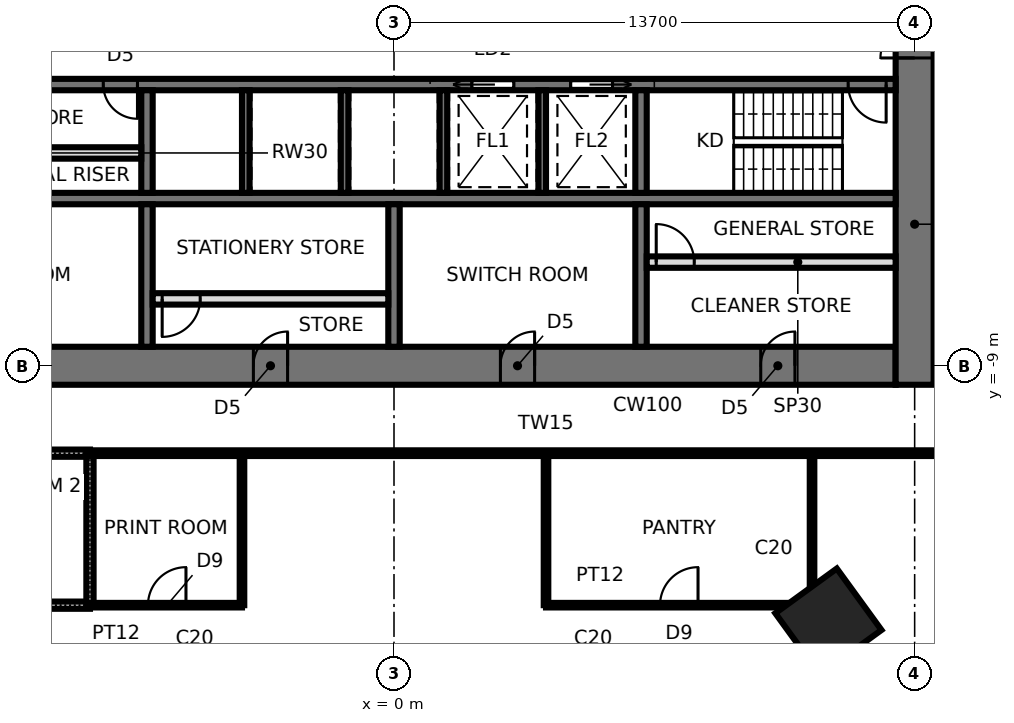
"""IFC4 building model, lengths in metres.
Left out: names, types, materials, properties, quantities, classifications, styles, units other than length and angle.
Written with IfcOpenShell. Run it as: python <this file> out.ifc"""

import sys

from ifc_helpers import new_model, si_unit, direction, frame, frame_2d, origin, origin_2d, place, context, subcontext, project, spatial, rectangle, extrude, element, fill, save


model = new_model("IFC4")
c1 = context("Model", 3, precision=1e-05, world=origin(), true_north=direction((0.0, 1.0)))
c2 = subcontext(c1, "Body", "Model", "MODEL_VIEW")
j1 = project(units=[si_unit("LENGTHUNIT", "METRE"), si_unit("PLANEANGLEUNIT", "RADIAN")], contexts=[c1])
p1 = place(None, origin())
s1 = spatial("IfcSite", under=j1, at=p1, CompositionType="ELEMENT")
p2 = place(p1, origin())
s2 = spatial("IfcBuilding", under=s1, at=p2, CompositionType="ELEMENT")
p3 = place(p2, frame((0.0, 0.0, 32.2)))
s3 = spatial("IfcBuildingStorey", under=s2, at=p3, CompositionType="ELEMENT", Elevation=32.2)
p4 = place(p3, frame((11.43, -15.733, 0.0), z_axis=(0.0, 0.0, 1.0), x_axis=(0.587785252292, -0.809016994375, 0.0)))
e1 = element("IfcColumn", 1, at=p4, inside=s3, PredefinedType="COLUMN", context=c2, shape_type="SweptSolid", body=[
    extrude(rectangle(XDim=2.0, YDim=2.0, at=origin_2d()), origin(), (0.0, 0.0, 1.0), 4.2),
])
p5 = place(p3, frame((-13.2, -9.0, 0.0), z_axis=(0.0, 0.0, 1.0), x_axis=(1.0, 0.0, 0.0)))
e2 = element("IfcWall", 2, at=p5, inside=s3, PredefinedType="SHEAR", context=c2, shape_type="SweptSolid", body=[
    extrude(rectangle(XDim=26.4, YDim=1.0, at=frame_2d((13.2, 0.0))), origin(), (0.0, 0.0, 1.0), 4.2),
])
p6 = place(p5, frame((2.65, 0.0, 0.0)))
e3 = element("IfcOpeningElement", 3, at=p6, cuts=e2, PredefinedType="OPENING", context=c2, shape_type="SweptSolid", body=[
    extrude(rectangle(XDim=0.9, YDim=2.1, at=frame_2d((0.45, 1.05))), frame((0.0, 0.51, 0.0), z_axis=(0.0, -1.0, 0.0), x_axis=(1.0, 0.0, 0.0)), (0.0, 0.0, 1.0), 1.02),
])
p7 = place(p5, frame((9.5, 0.0, 0.0)))
e4 = element("IfcOpeningElement", 4, at=p7, cuts=e2, PredefinedType="OPENING", context=c2, shape_type="SweptSolid", body=[
    extrude(rectangle(XDim=0.9, YDim=2.1, at=frame_2d((0.45, 1.05))), frame((0.0, 0.51, 0.0), z_axis=(0.0, -1.0, 0.0), x_axis=(1.0, 0.0, 0.0)), (0.0, 0.0, 1.0), 1.02),
])
p8 = place(p5, frame((16.0, 0.0, 0.0)))
e5 = element("IfcOpeningElement", 5, at=p8, cuts=e2, PredefinedType="OPENING", context=c2, shape_type="SweptSolid", body=[
    extrude(rectangle(XDim=0.9, YDim=2.1, at=frame_2d((0.45, 1.05))), frame((0.0, 0.51, 0.0), z_axis=(0.0, -1.0, 0.0), x_axis=(1.0, 0.0, 0.0)), (0.0, 0.0, 1.0), 1.02),
])
p9 = place(p5, frame((22.85, 0.0, 0.0)))
e6 = element("IfcOpeningElement", 6, at=p9, cuts=e2, PredefinedType="OPENING", context=c2, shape_type="SweptSolid", body=[
    extrude(rectangle(XDim=0.9, YDim=2.1, at=frame_2d((0.45, 1.05))), frame((0.0, 0.51, 0.0), z_axis=(0.0, -1.0, 0.0), x_axis=(1.0, 0.0, 0.0)), (0.0, 0.0, 1.0), 1.02),
])
p10 = place(p3, frame((13.7, -9.5, 0.0), z_axis=(0.0, 0.0, 1.0), x_axis=(0.0, 1.0, 0.0)))
e7 = element("IfcWall", 7, at=p10, inside=s3, PredefinedType="SHEAR", context=c2, shape_type="SweptSolid", body=[
    extrude(rectangle(XDim=19.0, YDim=1.0, at=frame_2d((9.5, 0.0))), origin(), (0.0, 0.0, 1.0), 4.2),
])
p11 = place(p10, frame((8.6, 0.0, 0.0)))
e8 = element("IfcOpeningElement", 8, at=p11, cuts=e7, PredefinedType="OPENING", context=c2, shape_type="SweptSolid", body=[
    extrude(rectangle(XDim=1.8, YDim=2.4, at=frame_2d((0.9, 1.2))), frame((0.0, 0.51, 0.0), z_axis=(0.0, -1.0, 0.0), x_axis=(1.0, 0.0, 0.0)), (0.0, 0.0, 1.0), 1.02),
])
p12 = place(p3, frame((-13.2, -1.6, 0.0), z_axis=(0.0, 0.0, 1.0), x_axis=(1.0, 0.0, 0.0)))
e9 = element("IfcWall", 9, at=p12, inside=s3, PredefinedType="SHEAR", context=c2, shape_type="SweptSolid", body=[
    extrude(rectangle(XDim=26.4, YDim=0.3, at=frame_2d((13.2, 0.0))), origin(), (0.0, 0.0, 1.0), 4.2),
])
p13 = place(p12, frame((25.15, 0.0, 0.0)))
e10 = element("IfcOpeningElement", 10, at=p13, cuts=e9, PredefinedType="OPENING", context=c2, shape_type="SweptSolid", body=[
    extrude(rectangle(XDim=1.0, YDim=2.1, at=frame_2d((0.5, 1.05))), frame((0.0, 0.16, 0.0), z_axis=(0.0, -1.0, 0.0), x_axis=(1.0, 0.0, 0.0)), (0.0, 0.0, 1.0), 0.32),
])
p14 = place(p12, frame((15.25, 0.0, 0.0)))
e11 = element("IfcOpeningElement", 11, at=p14, cuts=e9, PredefinedType="OPENING", context=c2, shape_type="SweptSolid", body=[
    extrude(rectangle(XDim=1.1, YDim=2.3, at=frame_2d((0.55, 1.15))), frame((0.0, 0.16, 0.0), z_axis=(0.0, -1.0, 0.0), x_axis=(1.0, 0.0, 0.0)), (0.0, 0.0, 1.0), 0.32),
])
p15 = place(p12, frame((17.85, 0.0, 0.0)))
e12 = element("IfcOpeningElement", 12, at=p15, cuts=e9, PredefinedType="OPENING", context=c2, shape_type="SweptSolid", body=[
    extrude(rectangle(XDim=1.1, YDim=2.3, at=frame_2d((0.55, 1.15))), frame((0.0, 0.16, 0.0), z_axis=(0.0, -1.0, 0.0), x_axis=(1.0, 0.0, 0.0)), (0.0, 0.0, 1.0), 0.32),
])
p16 = place(p12, frame((5.55, 0.0, 0.0)))
e13 = element("IfcOpeningElement", 13, at=p16, cuts=e9, PredefinedType="OPENING", context=c2, shape_type="SweptSolid", body=[
    extrude(rectangle(XDim=0.9, YDim=2.1, at=frame_2d((0.45, 1.05))), frame((0.0, 0.16, 0.0), z_axis=(0.0, -1.0, 0.0), x_axis=(1.0, 0.0, 0.0)), (0.0, 0.0, 1.0), 0.32),
])
p17 = place(p3, frame((-13.2, -4.6, 0.0), z_axis=(0.0, 0.0, 1.0), x_axis=(1.0, 0.0, 0.0)))
e14 = element("IfcWall", 14, at=p17, inside=s3, PredefinedType="SHEAR", context=c2, shape_type="SweptSolid", body=[
    extrude(rectangle(XDim=26.4, YDim=0.3, at=frame_2d((13.2, 0.0))), origin(), (0.0, 0.0, 1.0), 4.2),
])
p18 = place(p3, frame((-6.5, -1.75, 0.0), z_axis=(0.0, 0.0, 1.0), x_axis=(0.0, -1.0, 0.0)))
e15 = element("IfcWall", 15, at=p18, inside=s3, PredefinedType="SHEAR", context=c2, shape_type="SweptSolid", body=[
    extrude(rectangle(XDim=2.7, YDim=0.3, at=frame_2d((1.35, 0.0))), origin(), (0.0, 0.0, 1.0), 4.2),
])
p19 = place(p3, frame((-6.5, -4.75, 0.0), z_axis=(0.0, 0.0, 1.0), x_axis=(0.0, -1.0, 0.0)))
e16 = element("IfcWall", 16, at=p19, inside=s3, PredefinedType="SHEAR", context=c2, shape_type="SweptSolid", body=[
    extrude(rectangle(XDim=3.75, YDim=0.3, at=frame_2d((1.875, 0.0))), origin(), (0.0, 0.0, 1.0), 4.2),
])
p20 = place(p3, frame((6.5, -1.75, 0.0), z_axis=(0.0, 0.0, 1.0), x_axis=(0.0, -1.0, 0.0)))
e17 = element("IfcWall", 17, at=p20, inside=s3, PredefinedType="SHEAR", context=c2, shape_type="SweptSolid", body=[
    extrude(rectangle(XDim=2.7, YDim=0.3, at=frame_2d((1.35, 0.0))), origin(), (0.0, 0.0, 1.0), 4.2),
])
p21 = place(p3, frame((6.5, -4.75, 0.0), z_axis=(0.0, 0.0, 1.0), x_axis=(0.0, -1.0, 0.0)))
e18 = element("IfcWall", 18, at=p21, inside=s3, PredefinedType="SHEAR", context=c2, shape_type="SweptSolid", body=[
    extrude(rectangle(XDim=3.75, YDim=0.3, at=frame_2d((1.875, 0.0))), origin(), (0.0, 0.0, 1.0), 4.2),
])
for number, where, z_axis, x_axis in (
    (19, (-3.9, -1.75, 0.0), (0.0, 0.0, 1.0), (0.0, -1.0, 0.0)),
    (20, (-1.3, -1.75, 0.0), (0.0, 0.0, 1.0), (0.0, -1.0, 0.0)),
    (21, (1.3, -1.75, 0.0), (0.0, 0.0, 1.0), (0.0, -1.0, 0.0)),
    (22, (3.9, -1.75, 0.0), (0.0, 0.0, 1.0), (0.0, -1.0, 0.0)),
):
    element("IfcWall", number, at=place(p3, frame(where, z_axis=z_axis, x_axis=x_axis)), inside=s3, PredefinedType="SHEAR", context=c2, shape_type="SweptSolid", body=[
        extrude(rectangle(XDim=2.7, YDim=0.2, at=frame_2d((1.35, 0.0))), origin(), (0.0, 0.0, 1.0), 4.2),
    ])
p22 = place(p3, frame((0.0, -4.75, 0.0), z_axis=(0.0, 0.0, 1.0), x_axis=(0.0, -1.0, 0.0)))
e23 = element("IfcWall", 23, at=p22, inside=s3, PredefinedType="SHEAR", context=c2, shape_type="SweptSolid", body=[
    extrude(rectangle(XDim=3.75, YDim=0.3, at=frame_2d((1.875, 0.0))), origin(), (0.0, 0.0, 1.0), 4.2),
])
p23 = place(p3, frame((-6.35, -7.24, 0.0), z_axis=(0.0, 0.0, 1.0), x_axis=(1.0, 0.0, 0.0)))
e24 = element("IfcWall", 24, at=p23, inside=s3, PredefinedType="PARTITIONING", context=c2, shape_type="SweptSolid", body=[
    extrude(rectangle(XDim=6.2, YDim=0.3, at=frame_2d((3.1, 0.0))), origin(), (0.0, 0.0, 1.0), 4.04),
])
p24 = place(p23, frame((0.25, 0.0, 0.0)))
e25 = element("IfcOpeningElement", 25, at=p24, cuts=e24, PredefinedType="OPENING", context=c2, shape_type="SweptSolid", body=[
    extrude(rectangle(XDim=1.0, YDim=2.4, at=frame_2d((0.5, 1.2))), frame((0.0, 0.16, 0.0), z_axis=(0.0, -1.0, 0.0), x_axis=(1.0, 0.0, 0.0)), (0.0, 0.0, 1.0), 0.32),
])
p25 = place(p3, frame((6.65, -6.272, 0.0), z_axis=(0.0, 0.0, 1.0), x_axis=(1.0, 0.0, 0.0)))
e26 = element("IfcWall", 26, at=p25, inside=s3, PredefinedType="PARTITIONING", context=c2, shape_type="SweptSolid", body=[
    extrude(rectangle(XDim=6.55, YDim=0.3, at=frame_2d((3.275, 0.0))), origin(), (0.0, 0.0, 1.0), 4.04),
])
p26 = place(p25, frame((0.25, 0.0, 0.0)))
e27 = element("IfcOpeningElement", 27, at=p26, cuts=e26, PredefinedType="OPENING", context=c2, shape_type="SweptSolid", body=[
    extrude(rectangle(XDim=1.0, YDim=2.4, at=frame_2d((0.5, 1.2))), frame((0.0, 0.16, 0.0), z_axis=(0.0, -1.0, 0.0), x_axis=(1.0, 0.0, 0.0)), (0.0, 0.0, 1.0), 0.32),
])
p27 = place(p3, frame((-13.2, -3.4, 0.0), z_axis=(0.0, 0.0, 1.0), x_axis=(1.0, 0.0, 0.0)))
e28 = element("IfcWall", 28, at=p27, inside=s3, PredefinedType="SOLIDWALL", context=c2, shape_type="SweptSolid", body=[
    extrude(rectangle(XDim=6.55, YDim=0.3, at=frame_2d((3.275, 0.0))), origin(), (0.0, 0.0, 1.0), 4.04),
])
p28 = place(p27, frame((0.25, 0.0, 0.0)))
e29 = element("IfcOpeningElement", 29, at=p28, cuts=e28, PredefinedType="OPENING", context=c2, shape_type="SweptSolid", body=[
    extrude(rectangle(XDim=0.9, YDim=2.1, at=frame_2d((0.45, 1.05))), frame((0.0, 0.16, 0.0), z_axis=(0.0, -1.0, 0.0), x_axis=(1.0, 0.0, 0.0)), (0.0, 0.0, 1.0), 0.32),
])
for number, where, z_axis, x_axis in (
    (30, (-8.0, -11.3, 0.0), (0.0, 0.0, 1.0), (-1.0, 0.0, 0.0)),
    (31, (-12.0, -15.3, 0.0), (0.0, 0.0, 1.0), (1.0, 0.0, 0.0)),
    (32, (-8.0, -11.3, 0.0), (0.0, 0.0, 1.0), (0.0, -1.0, 0.0)),
):
    element("IfcWall", number, at=place(p3, frame(where, z_axis=z_axis, x_axis=x_axis)), inside=s3, PredefinedType="SOLIDWALL", context=c2, shape_type="SweptSolid", body=[
        extrude(rectangle(XDim=4.0, YDim=0.19, at=frame_2d((2.0, 0.0))), origin(), (0.0, 0.0, 1.0), 4.04),
    ])
p29 = place(p3, frame((-8.0, -15.3, 0.0), z_axis=(0.0, 0.0, 1.0), x_axis=(1.0, 0.0, 0.0)))
e33 = element("IfcWall", 33, at=p29, inside=s3, PredefinedType="PARTITIONING", context=c2, shape_type="SweptSolid", body=[
    extrude(rectangle(XDim=4.0, YDim=0.12, at=frame_2d((2.0, 0.0))), origin(), (0.0, 0.0, 1.0), 3.586),
])
p30 = place(p29, frame((1.526, 0.0, 0.0)))
e34 = element("IfcOpeningElement", 34, at=p30, cuts=e33, PredefinedType="OPENING", context=c2, shape_type="SweptSolid", body=[
    extrude(rectangle(XDim=1.0, YDim=2.4, at=frame_2d((0.5, 1.2))), frame((0.0, 0.07, 0.0), z_axis=(0.0, -1.0, 0.0), x_axis=(1.0, 0.0, 0.0)), (0.0, 0.0, 1.0), 0.14),
])
for number, where, z_axis, x_axis in (
    (35, (-4.0, -15.3, 0.0), (0.0, 0.0, 1.0), (0.0, 1.0, 0.0)),
    (36, (4.0, -11.3, 0.0), (0.0, 0.0, 1.0), (0.0, -1.0, 0.0)),
):
    element("IfcWall", number, at=place(p3, frame(where, z_axis=z_axis, x_axis=x_axis)), inside=s3, PredefinedType="PARTITIONING", context=c2, shape_type="SweptSolid", body=[
        extrude(rectangle(XDim=4.0, YDim=0.12, at=frame_2d((2.0, 0.0))), origin(), (0.0, 0.0, 1.0), 4.04),
    ])
p31 = place(p3, frame((-8.0, -11.3, 0.0), z_axis=(0.0, 0.0, 1.0), x_axis=(1.0, 0.0, 0.0)))
e37 = element("IfcWall", 37, at=p31, inside=s3, PredefinedType="PARTITIONING", context=c2, shape_type="SweptSolid", body=[
    extrude(rectangle(XDim=24.0, YDim=0.15, at=frame_2d((12.0, 0.0))), origin(), (0.0, 0.0, 1.0), 4.04),
])
p32 = place(p3, frame((4.0, -15.3, 0.0), z_axis=(0.0, 0.0, 1.0), x_axis=(1.0, 0.0, 0.0)))
e38 = element("IfcWall", 38, at=p32, inside=s3, PredefinedType="PARTITIONING", context=c2, shape_type="SweptSolid", body=[
    extrude(rectangle(XDim=7.0, YDim=0.12, at=frame_2d((3.5, 0.0))), origin(), (0.0, 0.0, 1.0), 3.586),
])
p33 = place(p32, frame((3.0, 0.0, 0.0)))
e39 = element("IfcOpeningElement", 39, at=p33, cuts=e38, PredefinedType="OPENING", context=c2, shape_type="SweptSolid", body=[
    extrude(rectangle(XDim=1.0, YDim=2.4, at=frame_2d((0.5, 1.2))), frame((0.0, 0.07, 0.0), z_axis=(0.0, -1.0, 0.0), x_axis=(1.0, 0.0, 0.0)), (0.0, 0.0, 1.0), 0.14),
])
p34 = place(p3, frame((11.0, -15.3, 0.0), z_axis=(0.0, 0.0, 1.0), x_axis=(0.0, 1.0, 0.0)))
e40 = element("IfcWall", 40, at=p34, inside=s3, PredefinedType="PARTITIONING", context=c2, shape_type="SweptSolid", body=[
    extrude(rectangle(XDim=4.0, YDim=0.12, at=frame_2d((2.0, 0.0))), origin(), (0.0, 0.0, 1.0), 4.04),
])
p35 = place(p11, origin())
e41 = element("IfcDoor", 41, at=p35, inside=s3, OperationType="DOUBLE_DOOR_SINGLE_SWING", PredefinedType="DOOR", context=c2, shape_type="SweptSolid", body=[
    extrude(rectangle(XDim=1.72, YDim=2.36, at=frame_2d((0.9, 1.18))), frame((0.0, 0.025, 0.0), z_axis=(0.0, -1.0, 0.0), x_axis=(1.0, 0.0, 0.0)), (0.0, 0.0, 1.0), 0.05),
    extrude(rectangle(XDim=0.04, YDim=2.4, at=frame_2d((0.02, 1.2))), frame((0.0, 0.25, 0.0), z_axis=(0.0, -1.0, 0.0), x_axis=(1.0, 0.0, 0.0)), (0.0, 0.0, 1.0), 0.5),
    extrude(rectangle(XDim=0.04, YDim=2.4, at=frame_2d((1.78, 1.2))), frame((0.0, 0.25, 0.0), z_axis=(0.0, -1.0, 0.0), x_axis=(1.0, 0.0, 0.0)), (0.0, 0.0, 1.0), 0.5),
    extrude(rectangle(XDim=1.72, YDim=0.04, at=frame_2d((0.9, 2.38))), frame((0.0, 0.25, 0.0), z_axis=(0.0, -1.0, 0.0), x_axis=(1.0, 0.0, 0.0)), (0.0, 0.0, 1.0), 0.5),
])
fill(e8, e41)
p36 = place(p13, frame((1.0, 0.0, 0.0), z_axis=(0.0, 0.0, 1.0), x_axis=(-1.0, 0.0, 0.0)))
e42 = element("IfcDoor", 42, at=p36, inside=s3, OperationType="SINGLE_SWING_LEFT", PredefinedType="DOOR", context=c2, shape_type="SweptSolid", body=[
    extrude(rectangle(XDim=1.0, YDim=2.1, at=frame_2d((0.5, 1.05))), frame((0.0, 0.025, 0.0), z_axis=(0.0, -1.0, 0.0), x_axis=(1.0, 0.0, 0.0)), (0.0, 0.0, 1.0), 0.05),
])
fill(e10, e42)
p37 = place(p14, frame((1.1, 0.0, 0.0), z_axis=(0.0, 0.0, 1.0), x_axis=(-1.0, 0.0, 0.0)))
e43 = element("IfcDoor", 43, at=p37, inside=s3, OperationType="SLIDING_TO_RIGHT", PredefinedType="DOOR", context=c2, shape_type="SweptSolid", body=[
    extrude(rectangle(XDim=1.1, YDim=2.3, at=frame_2d((0.55, 1.15))), frame((0.0, 0.025, 0.0), z_axis=(0.0, -1.0, 0.0), x_axis=(1.0, 0.0, 0.0)), (0.0, 0.0, 1.0), 0.05),
])
fill(e11, e43)
p38 = place(p15, frame((1.1, 0.0, 0.0), z_axis=(0.0, 0.0, 1.0), x_axis=(-1.0, 0.0, 0.0)))
e44 = element("IfcDoor", 44, at=p38, inside=s3, OperationType="SLIDING_TO_LEFT", PredefinedType="DOOR", context=c2, shape_type="SweptSolid", body=[
    extrude(rectangle(XDim=1.1, YDim=2.3, at=frame_2d((0.55, 1.15))), frame((0.0, 0.025, 0.0), z_axis=(0.0, -1.0, 0.0), x_axis=(1.0, 0.0, 0.0)), (0.0, 0.0, 1.0), 0.05),
])
fill(e12, e44)
p39 = place(p16, frame((0.9, 0.0, 0.0), z_axis=(0.0, 0.0, 1.0), x_axis=(-1.0, 0.0, 0.0)))
e45 = element("IfcDoor", 45, at=p39, inside=s3, OperationType="SINGLE_SWING_LEFT", PredefinedType="DOOR", context=c2, shape_type="SweptSolid", body=[
    extrude(rectangle(XDim=0.9, YDim=2.1, at=frame_2d((0.45, 1.05))), frame((0.0, 0.025, 0.0), z_axis=(0.0, -1.0, 0.0), x_axis=(1.0, 0.0, 0.0)), (0.0, 0.0, 1.0), 0.05),
])
fill(e13, e45)
p40 = place(p7, origin())
e46 = element("IfcDoor", 46, at=p40, inside=s3, OperationType="SINGLE_SWING_RIGHT", PredefinedType="DOOR", context=c2, shape_type="SweptSolid", body=[
    extrude(rectangle(XDim=0.82, YDim=2.06, at=frame_2d((0.45, 1.03))), frame((0.0, 0.025, 0.0), z_axis=(0.0, -1.0, 0.0), x_axis=(1.0, 0.0, 0.0)), (0.0, 0.0, 1.0), 0.05),
    extrude(rectangle(XDim=0.04, YDim=2.1, at=frame_2d((0.02, 1.05))), frame((0.0, 0.25, 0.0), z_axis=(0.0, -1.0, 0.0), x_axis=(1.0, 0.0, 0.0)), (0.0, 0.0, 1.0), 0.5),
    extrude(rectangle(XDim=0.04, YDim=2.1, at=frame_2d((0.88, 1.05))), frame((0.0, 0.25, 0.0), z_axis=(0.0, -1.0, 0.0), x_axis=(1.0, 0.0, 0.0)), (0.0, 0.0, 1.0), 0.5),
    extrude(rectangle(XDim=0.82, YDim=0.04, at=frame_2d((0.45, 2.08))), frame((0.0, 0.25, 0.0), z_axis=(0.0, -1.0, 0.0), x_axis=(1.0, 0.0, 0.0)), (0.0, 0.0, 1.0), 0.5),
])
fill(e4, e46)
p41 = place(p8, origin())
e47 = element("IfcDoor", 47, at=p41, inside=s3, OperationType="SINGLE_SWING_RIGHT", PredefinedType="DOOR", context=c2, shape_type="SweptSolid", body=[
    extrude(rectangle(XDim=0.82, YDim=2.06, at=frame_2d((0.45, 1.03))), frame((0.0, 0.025, 0.0), z_axis=(0.0, -1.0, 0.0), x_axis=(1.0, 0.0, 0.0)), (0.0, 0.0, 1.0), 0.05),
    extrude(rectangle(XDim=0.04, YDim=2.1, at=frame_2d((0.02, 1.05))), frame((0.0, 0.25, 0.0), z_axis=(0.0, -1.0, 0.0), x_axis=(1.0, 0.0, 0.0)), (0.0, 0.0, 1.0), 0.5),
    extrude(rectangle(XDim=0.04, YDim=2.1, at=frame_2d((0.88, 1.05))), frame((0.0, 0.25, 0.0), z_axis=(0.0, -1.0, 0.0), x_axis=(1.0, 0.0, 0.0)), (0.0, 0.0, 1.0), 0.5),
    extrude(rectangle(XDim=0.82, YDim=0.04, at=frame_2d((0.45, 2.08))), frame((0.0, 0.25, 0.0), z_axis=(0.0, -1.0, 0.0), x_axis=(1.0, 0.0, 0.0)), (0.0, 0.0, 1.0), 0.5),
])
fill(e5, e47)
p42 = place(p9, origin())
e48 = element("IfcDoor", 48, at=p42, inside=s3, OperationType="SINGLE_SWING_RIGHT", PredefinedType="DOOR", context=c2, shape_type="SweptSolid", body=[
    extrude(rectangle(XDim=0.82, YDim=2.06, at=frame_2d((0.45, 1.03))), frame((0.0, 0.025, 0.0), z_axis=(0.0, -1.0, 0.0), x_axis=(1.0, 0.0, 0.0)), (0.0, 0.0, 1.0), 0.05),
    extrude(rectangle(XDim=0.04, YDim=2.1, at=frame_2d((0.02, 1.05))), frame((0.0, 0.25, 0.0), z_axis=(0.0, -1.0, 0.0), x_axis=(1.0, 0.0, 0.0)), (0.0, 0.0, 1.0), 0.5),
    extrude(rectangle(XDim=0.04, YDim=2.1, at=frame_2d((0.88, 1.05))), frame((0.0, 0.25, 0.0), z_axis=(0.0, -1.0, 0.0), x_axis=(1.0, 0.0, 0.0)), (0.0, 0.0, 1.0), 0.5),
    extrude(rectangle(XDim=0.82, YDim=0.04, at=frame_2d((0.45, 2.08))), frame((0.0, 0.25, 0.0), z_axis=(0.0, -1.0, 0.0), x_axis=(1.0, 0.0, 0.0)), (0.0, 0.0, 1.0), 0.5),
])
fill(e6, e48)
p43 = place(p24, frame((1.0, 0.0, 0.0), z_axis=(0.0, 0.0, 1.0), x_axis=(-1.0, 0.0, 0.0)))
e49 = element("IfcDoor", 49, at=p43, inside=s3, OperationType="SINGLE_SWING_RIGHT", PredefinedType="DOOR", context=c2, shape_type="SweptSolid", body=[
    extrude(rectangle(XDim=1.0, YDim=2.4, at=frame_2d((0.5, 1.2))), frame((0.0, 0.025, 0.0), z_axis=(0.0, -1.0, 0.0), x_axis=(1.0, 0.0, 0.0)), (0.0, 0.0, 1.0), 0.05),
])
fill(e25, e49)
p44 = place(p26, origin())
e50 = element("IfcDoor", 50, at=p44, inside=s3, OperationType="SINGLE_SWING_LEFT", PredefinedType="DOOR", context=c2, shape_type="SweptSolid", body=[
    extrude(rectangle(XDim=1.0, YDim=2.4, at=frame_2d((0.5, 1.2))), frame((0.0, 0.025, 0.0), z_axis=(0.0, -1.0, 0.0), x_axis=(1.0, 0.0, 0.0)), (0.0, 0.0, 1.0), 0.05),
])
fill(e27, e50)
p45 = place(p33, origin())
e51 = element("IfcDoor", 51, at=p45, inside=s3, OperationType="SINGLE_SWING_RIGHT", PredefinedType="DOOR", context=c2, shape_type="SweptSolid", body=[
    extrude(rectangle(XDim=1.0, YDim=2.4, at=frame_2d((0.5, 1.2))), frame((0.0, 0.025, 0.0), z_axis=(0.0, -1.0, 0.0), x_axis=(1.0, 0.0, 0.0)), (0.0, 0.0, 1.0), 0.05),
])
fill(e39, e51)
p46 = place(p30, origin())
e52 = element("IfcDoor", 52, at=p46, inside=s3, OperationType="SINGLE_SWING_RIGHT", PredefinedType="DOOR", context=c2, shape_type="SweptSolid", body=[
    extrude(rectangle(XDim=1.0, YDim=2.4, at=frame_2d((0.5, 1.2))), frame((0.0, 0.025, 0.0), z_axis=(0.0, -1.0, 0.0), x_axis=(1.0, 0.0, 0.0)), (0.0, 0.0, 1.0), 0.05),
])
fill(e34, e52)
save(model, sys.argv[1])
